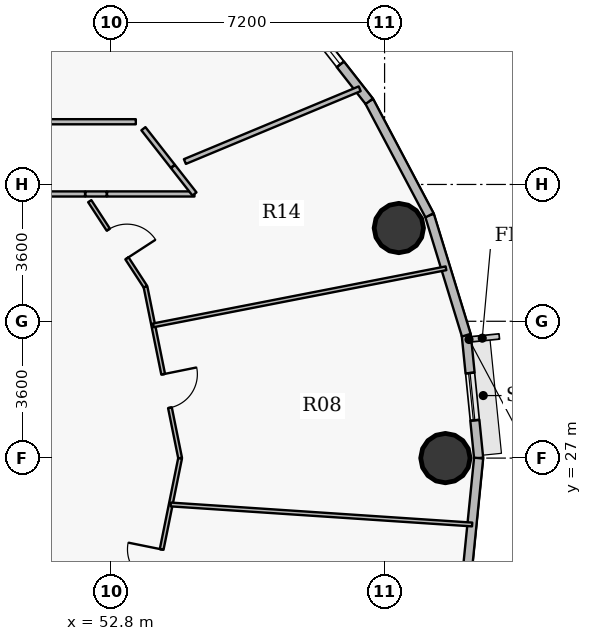
"""IFC4 building model, lengths in metres.
Left out: names, types, materials, properties, quantities, classifications, styles, units other than length and angle.
Written with IfcOpenShell. Run it as: python <this file> out.ifc"""

import sys

from ifc_helpers import new_model, si_unit, direction, frame, frame_2d, origin, origin_2d, place, context, subcontext, project, spatial, rectangle, hollow_circle, extrude, source, transform, mapped, element, fill, save


model = new_model("IFC4")
c1 = context("Model", 3, precision=1e-05, world=origin(), true_north=direction((0.0, 1.0)))
c2 = subcontext(c1, "Body", "Model", "MODEL_VIEW")
j1 = project(units=[si_unit("LENGTHUNIT", "METRE"), si_unit("PLANEANGLEUNIT", "RADIAN")], contexts=[c1])
p1 = place(None, origin())
s1 = spatial("IfcSite", under=j1, at=p1, CompositionType="ELEMENT")
p2 = place(p1, origin())
s2 = spatial("IfcBuilding", under=s1, at=p2, CompositionType="ELEMENT")
p3 = place(p2, frame((0.0, 0.0, 167.4)))
s3 = spatial("IfcBuildingStorey", under=s2, at=p3, CompositionType="ELEMENT", Elevation=167.4)
for number, where, z_axis, x_axis in (
    (1, (61.6, 27.0, 0.0), (0.0, 0.0, 1.0), (1.0, 0.0, 0.0)),
    (2, (60.375, 33.053, 0.0), (0.0, 0.0, 1.0), (1.0, 0.0, 0.0)),
):
    element("IfcColumn", number, at=place(p3, frame(where, z_axis=z_axis, x_axis=x_axis)), inside=s3, PredefinedType="COLUMN", context=c2, shape_type="SweptSolid", body=[
        extrude(hollow_circle(Radius=0.65, WallThickness=0.04, at=origin_2d()), origin(), (0.0, 0.0, 1.0), 3.75),
    ])
p4 = place(p3, frame((62.15, 30.234, 0.0), z_axis=(0.0, 0.0, 1.0), x_axis=(0.100061534614, -0.994981250723, 0.0)))
e3 = element("IfcWall", 3, at=p4, inside=s3, PredefinedType="SOLIDWALL", context=c2, shape_type="SweptSolid", body=[
    extrude(rectangle(XDim=3.25, YDim=0.24, at=frame_2d((1.625, 0.0))), origin(), (0.0, 0.0, 1.0), 3.5),
])
p5 = place(p4, frame((1.0, 0.0, 0.9)))
e4 = element("IfcOpeningElement", 4, at=p5, cuts=e3, PredefinedType="OPENING", context=c2, shape_type="SweptSolid", body=[
    extrude(rectangle(XDim=1.25, YDim=1.65, at=origin_2d()), frame((0.625, 0.13, 0.825), z_axis=(0.0, -1.0, 0.0), x_axis=(1.0, 0.0, 0.0)), (0.0, 0.0, 1.0), 0.26),
])
p6 = place(p3, frame((61.183, 33.389, 0.0), z_axis=(0.0, 0.0, 1.0), x_axis=(0.293097995113, -0.956082405058, 0.0)))
e5 = element("IfcWall", 5, at=p6, inside=s3, PredefinedType="SOLIDWALL", context=c2, shape_type="SweptSolid", body=[
    extrude(rectangle(XDim=3.3, YDim=0.24, at=frame_2d((1.65, 0.0))), origin(), (0.0, 0.0, 1.0), 3.5),
])
p7 = place(p3, frame((59.596, 36.388, 0.0), z_axis=(0.0, 0.0, 1.0), x_axis=(0.467586874938, -0.88394712194, 0.0)))
e6 = element("IfcWall", 6, at=p7, inside=s3, PredefinedType="SOLIDWALL", context=c2, shape_type="SweptSolid", body=[
    extrude(rectangle(XDim=3.393, YDim=0.24, at=frame_2d((1.697, 0.0))), origin(), (0.0, 0.0, 1.0), 3.5),
])
p8 = place(p3, frame((57.428, 39.158, 0.0), z_axis=(0.0, 0.0, 1.0), x_axis=(0.616287674549, -0.787521112224, 0.0)))
e7 = element("IfcWall", 7, at=p8, inside=s3, PredefinedType="SOLIDWALL", context=c2, shape_type="SweptSolid", body=[
    extrude(rectangle(XDim=3.517, YDim=0.24, at=frame_2d((1.759, 0.0))), origin(), (0.0, 0.0, 1.0), 3.5),
])
p9 = place(p8, frame((0.684, 0.0, 0.9)))
e8 = element("IfcOpeningElement", 8, at=p9, cuts=e7, PredefinedType="OPENING", context=c2, shape_type="SweptSolid", body=[
    extrude(rectangle(XDim=1.6, YDim=1.75, at=origin_2d()), frame((0.8, 0.13, 0.875), z_axis=(0.0, -1.0, 0.0), x_axis=(1.0, 0.0, 0.0)), (0.0, 0.0, 1.0), 0.26),
])
p10 = place(p3, frame((62.475, 27.0, 0.0), z_axis=(0.0, 0.0, 1.0), x_axis=(-0.100061534614, -0.994981250723, 0.0)))
e9 = element("IfcWall", 9, at=p10, inside=s3, PredefinedType="SOLIDWALL", context=c2, shape_type="SweptSolid", body=[
    extrude(rectangle(XDim=3.25, YDim=0.24, at=frame_2d((1.625, 0.0))), origin(), (0.0, 0.0, 1.0), 3.5),
])
p11 = place(p3, frame((45.8, 33.95, 0.0), z_axis=(0.0, 0.0, 1.0), x_axis=(1.0, 0.0, 0.0)))
e10 = element("IfcWall", 10, at=p11, inside=s3, PredefinedType="PARTITIONING", context=c2, shape_type="SweptSolid", body=[
    extrude(rectangle(XDim=6.318, YDim=0.135, at=frame_2d((3.159, 0.0))), origin(), (0.0, 0.0, 1.0), 3.5),
])
p12 = place(p3, frame((52.241, 33.761, 0.0), z_axis=(0.0, 0.0, 1.0), x_axis=(0.545409337775, -0.838169824241, 0.0)))
e11 = element("IfcWall", 11, at=p12, inside=s3, PredefinedType="PARTITIONING", context=c2, shape_type="SweptSolid", body=[
    extrude(rectangle(XDim=2.69, YDim=0.1, at=frame_2d((1.345, 0.0))), origin(), (0.0, 0.0, 1.0), 2.935),
])
p13 = place(p12, frame((0.895, 0.0, 0.0)))
e12 = element("IfcOpeningElement", 12, at=p13, cuts=e11, PredefinedType="OPENING", context=c2, shape_type="SweptSolid", body=[
    extrude(rectangle(XDim=0.9, YDim=2.1, at=origin_2d()), frame((0.45, 0.06, 1.05), z_axis=(0.0, -1.0, 0.0), x_axis=(1.0, 0.0, 0.0)), (0.0, 0.0, 1.0), 0.12),
])
p14 = place(p3, frame((52.696, 33.95, 0.0), z_axis=(0.0, 0.0, 1.0), x_axis=(1.0, 0.0, 0.0)))
e13 = element("IfcWall", 13, at=p14, inside=s3, PredefinedType="PARTITIONING", context=c2, shape_type="SweptSolid", body=[
    extrude(rectangle(XDim=2.301, YDim=0.135, at=frame_2d((1.15, 0.0))), origin(), (0.0, 0.0, 1.0), 3.5),
])
p15 = place(p3, frame((53.709, 22.494, 0.0), z_axis=(0.0, 0.0, 1.0), x_axis=(0.198209478932, 0.980159682124, 0.0)))
e14 = element("IfcWall", 14, at=p15, inside=s3, PredefinedType="PARTITIONING", context=c2, shape_type="SweptSolid", body=[
    extrude(rectangle(XDim=4.597, YDim=0.1, at=frame_2d((2.298, 0.0))), origin(), (0.0, 0.0, 1.0), 2.935),
])
p16 = place(p15, frame((1.246, 0.0, 0.0)))
e15 = element("IfcOpeningElement", 15, at=p16, cuts=e14, PredefinedType="OPENING", context=c2, shape_type="SweptSolid", body=[
    extrude(rectangle(XDim=0.9, YDim=2.1, at=origin_2d()), frame((0.45, 0.06, 1.05), z_axis=(0.0, -1.0, 0.0), x_axis=(1.0, 0.0, 0.0)), (0.0, 0.0, 1.0), 0.12),
])
p17 = place(p3, frame((53.709, 31.506, 0.0), z_axis=(0.0, 0.0, 1.0), x_axis=(0.19825018224, -0.980151450155, 0.0)))
e16 = element("IfcWall", 16, at=p17, inside=s3, PredefinedType="PARTITIONING", context=c2, shape_type="SweptSolid", body=[
    extrude(rectangle(XDim=4.597, YDim=0.1, at=frame_2d((2.299, 0.0))), origin(), (0.0, 0.0, 1.0), 2.935),
])
p18 = place(p17, frame((2.345, 0.0, 0.0)))
e17 = element("IfcOpeningElement", 17, at=p18, cuts=e16, PredefinedType="OPENING", context=c2, shape_type="SweptSolid", body=[
    extrude(rectangle(XDim=0.9, YDim=2.1, at=origin_2d()), frame((0.45, 0.06, 1.05), z_axis=(0.0, -1.0, 0.0), x_axis=(1.0, 0.0, 0.0)), (0.0, 0.0, 1.0), 0.12),
])
p19 = place(p3, frame((53.914, 30.493, 0.0), z_axis=(0.0, 0.0, 1.0), x_axis=(0.981522814431, 0.191345145616, 0.0)))
e18 = element("IfcWall", 18, at=p19, inside=s3, PredefinedType="PARTITIONING", context=c2, shape_type="SweptSolid", body=[
    extrude(rectangle(XDim=7.847, YDim=0.1, at=frame_2d((3.923, 0.0))), origin(), (0.0, 0.0, 1.0), 2.935),
])
p20 = place(p3, frame((54.373, 25.78, 0.0), z_axis=(0.0, 0.0, 1.0), x_axis=(0.997802925864, -0.066251951951, 0.0)))
e19 = element("IfcWall", 19, at=p20, inside=s3, PredefinedType="PARTITIONING", context=c2, shape_type="SweptSolid", body=[
    extrude(rectangle(XDim=7.949, YDim=0.1, at=frame_2d((3.974, 0.0))), origin(), (0.0, 0.0, 1.0), 2.935),
])
p21 = place(p3, frame((54.432, 34.672, 0.0), z_axis=(0.0, 0.0, 1.0), x_axis=(0.616351315364, -0.787471304905, 0.0)))
e20 = element("IfcWall", 20, at=p21, inside=s3, PredefinedType="PARTITIONING", context=c2, shape_type="SweptSolid", body=[
    extrude(rectangle(XDim=0.917, YDim=0.135, at=frame_2d((0.459, 0.0))), origin(), (0.0, 0.0, 1.0), 3.5),
])
p22 = place(p3, frame((43.703, 35.85, 0.0), z_axis=(0.0, 0.0, 1.0), x_axis=(1.0, 0.0, 0.0)))
e21 = element("IfcWall", 21, at=p22, inside=s3, PredefinedType="PARTITIONING", context=c2, shape_type="SweptSolid", body=[
    extrude(rectangle(XDim=9.751, YDim=0.135, at=frame_2d((4.875, 0.0))), origin(), (0.0, 0.0, 1.0), 2.935),
])
p23 = place(p3, frame((53.653, 35.667, 0.0), z_axis=(0.0, 0.0, 1.0), x_axis=(0.616271486236, -0.787533780388, 0.0)))
e22 = element("IfcWall", 22, at=p23, inside=s3, PredefinedType="PARTITIONING", context=c2, shape_type="SweptSolid", body=[
    extrude(rectangle(XDim=1.253, YDim=0.135, at=frame_2d((0.626, 0.0))), origin(), (0.0, 0.0, 1.0), 3.5),
])
p24 = place(p3, frame((52.686, 33.95, 0.0), z_axis=(0.0, 0.0, 1.0), x_axis=(-1.0, 0.0, 0.0)))
e23 = element("IfcWall", 23, at=p24, inside=s3, PredefinedType="PARTITIONING", context=c2, shape_type="SweptSolid", body=[
    extrude(rectangle(XDim=0.558, YDim=0.135, at=frame_2d((0.279, 0.0))), origin(), (0.0, 0.0, 1.0), 3.5),
])
p25 = place(p3, frame((54.745, 34.803, 0.0), z_axis=(0.0, 0.0, 1.0), x_axis=(0.92320880582, 0.384298713055, 0.0)))
e24 = element("IfcWall", 24, at=p25, inside=s3, PredefinedType="PARTITIONING", context=c2, shape_type="SweptSolid", body=[
    extrude(rectangle(XDim=4.982, YDim=0.135, at=frame_2d((2.491, 0.0))), origin(), (0.0, 0.0, 1.0), 2.935),
])
m1 = source(origin(), c2, "Body", "SweptSolid", [
    extrude(rectangle(XDim=1.6, YDim=1.75, at=origin_2d()), frame((0.8, 0.03, 0.875), z_axis=(0.0, -1.0, 0.0), x_axis=(1.0, 0.0, 0.0)), (0.0, 0.0, 1.0), 0.06),
])
p26 = place(p9, origin())
e25 = element("IfcWindow", 25, at=p26, inside=s3, PartitioningType="DOUBLE_PANEL_VERTICAL", PredefinedType="WINDOW", context=c2, shape_type="MappedRepresentation", body=[
    mapped(m1, transform((0.0, 0.0, 0.0), x_axis=(1.0, 0.0, 0.0), y_axis=(0.0, 1.0, 0.0), z_axis=(0.0, 0.0, 1.0), scale=1.0)),
])
fill(e8, e25)
m2 = source(origin(), c2, "Body", "SweptSolid", [
    extrude(rectangle(XDim=1.25, YDim=1.65, at=origin_2d()), frame((0.625, 0.03, 0.825), z_axis=(0.0, -1.0, 0.0), x_axis=(1.0, 0.0, 0.0)), (0.0, 0.0, 1.0), 0.06),
])
p27 = place(p5, origin())
e26 = element("IfcWindow", 26, at=p27, inside=s3, PartitioningType="SINGLE_PANEL", PredefinedType="WINDOW", context=c2, shape_type="MappedRepresentation", body=[
    mapped(m2, transform((0.0, 0.0, 0.0), x_axis=(1.0, 0.0, 0.0), y_axis=(0.0, 1.0, 0.0), z_axis=(0.0, 0.0, 1.0), scale=1.0)),
])
fill(e4, e26)
m3 = source(origin(), c2, "Body", "SweptSolid", [
    extrude(rectangle(XDim=0.9, YDim=2.1, at=origin_2d()), frame((0.45, 0.025, 1.05), z_axis=(0.0, -1.0, 0.0), x_axis=(1.0, 0.0, 0.0)), (0.0, 0.0, 1.0), 0.05),
])
p28 = place(p16, origin())
e27 = element("IfcDoor", 27, at=p28, inside=s3, OperationType="SINGLE_SWING_RIGHT", PredefinedType="DOOR", context=c2, shape_type="MappedRepresentation", body=[
    mapped(m3, transform((0.0, 0.0, 0.0), x_axis=(1.0, 0.0, 0.0), y_axis=(0.0, 1.0, 0.0), z_axis=(0.0, 0.0, 1.0), scale=1.0)),
])
fill(e15, e27)
p29 = place(p18, origin())
e28 = element("IfcDoor", 28, at=p29, inside=s3, OperationType="SINGLE_SWING_LEFT", PredefinedType="DOOR", context=c2, shape_type="MappedRepresentation", body=[
    mapped(m3, transform((0.0, 0.0, 0.0), x_axis=(1.0, 0.0, 0.0), y_axis=(0.0, 1.0, 0.0), z_axis=(0.0, 0.0, 1.0), scale=1.0)),
])
fill(e17, e28)
p30 = place(p13, origin())
e29 = element("IfcDoor", 29, at=p30, inside=s3, OperationType="SINGLE_SWING_RIGHT", PredefinedType="DOOR", context=c2, shape_type="MappedRepresentation", body=[
    mapped(m3, transform((0.0, 0.0, 0.0), x_axis=(1.0, 0.0, 0.0), y_axis=(0.0, 1.0, 0.0), z_axis=(0.0, 0.0, 1.0), scale=1.0)),
])
fill(e12, e29)
save(model, sys.argv[1])
